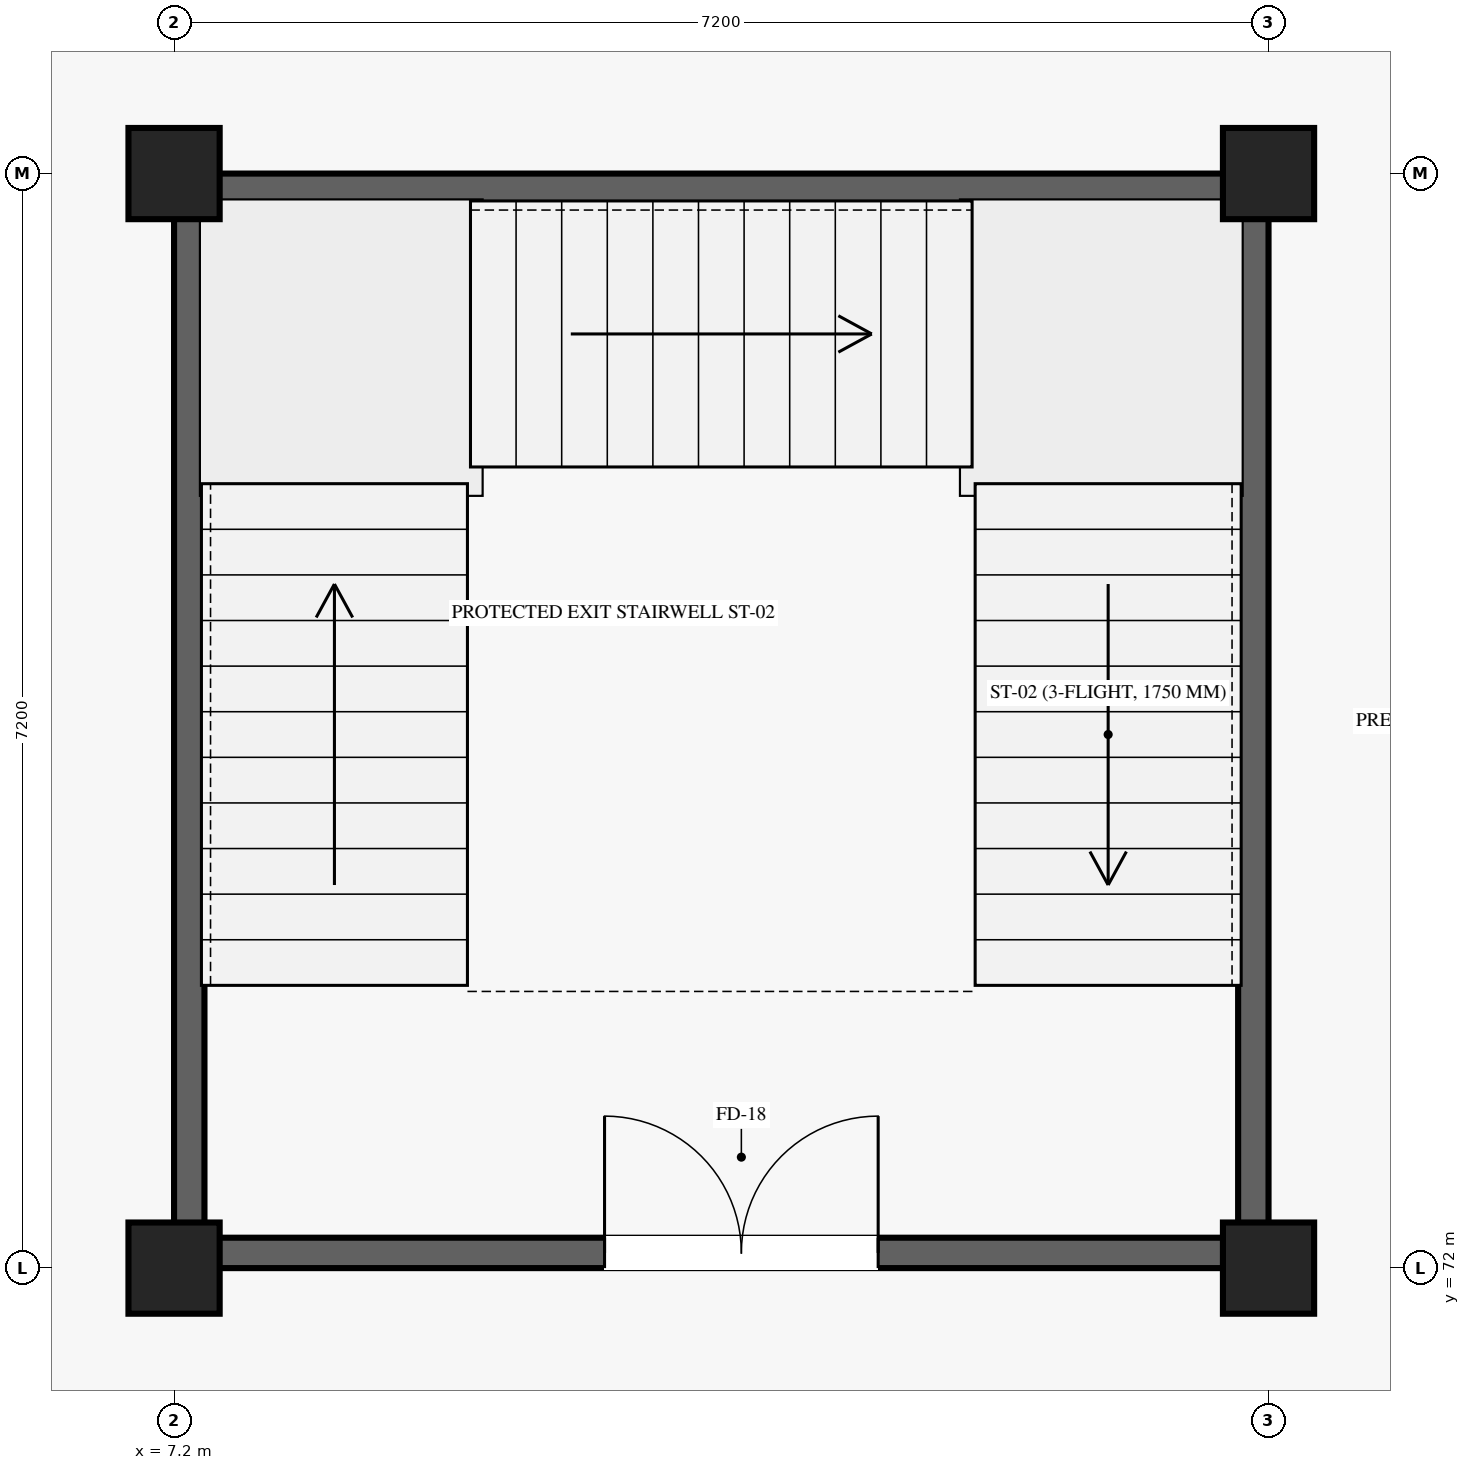
"""IFC4 building model, lengths in metres.
Left out: names, types, materials, properties, quantities, classifications, styles, units other than length and angle.
Written with IfcOpenShell. Run it as: python <this file> out.ifc"""

import sys

from ifc_helpers import new_model, si_unit, direction, frame, frame_2d, origin, origin_2d, place, context, subcontext, project, spatial, rectangle, extrude, element, fill, save


model = new_model("IFC4")
c1 = context("Model", 3, precision=1e-05, world=origin(), true_north=direction((0.0, 1.0)))
c2 = subcontext(c1, "Body", "Model", "MODEL_VIEW")
j1 = project(units=[si_unit("LENGTHUNIT", "METRE"), si_unit("PLANEANGLEUNIT", "RADIAN")], contexts=[c1])
p1 = place(None, origin())
s1 = spatial("IfcSite", under=j1, at=p1, CompositionType="ELEMENT")
p2 = place(p1, origin())
s2 = spatial("IfcBuilding", under=s1, at=p2, CompositionType="ELEMENT")
p3 = place(p2, origin())
s3 = spatial("IfcBuildingStorey", under=s2, at=p3, CompositionType="ELEMENT", Elevation=0.0)
for number, where, z_axis, x_axis in (
    (1, (7.2, 72.0, 0.0), (0.0, 0.0, 1.0), (1.0, 0.0, 0.0)),
    (2, (7.2, 79.2, 0.0), (0.0, 0.0, 1.0), (1.0, 0.0, 0.0)),
    (3, (14.4, 72.0, 0.0), (0.0, 0.0, 1.0), (1.0, 0.0, 0.0)),
    (4, (14.4, 79.2, 0.0), (0.0, 0.0, 1.0), (1.0, 0.0, 0.0)),
):
    element("IfcColumn", number, at=place(p3, frame(where, z_axis=z_axis, x_axis=x_axis)), inside=s3, PredefinedType="COLUMN", context=c2, shape_type="SweptSolid", body=[
        extrude(rectangle(XDim=0.9, YDim=0.9, at=origin_2d()), origin(), (0.0, 0.0, 1.0), 5.4),
    ])
p4 = place(p3, frame((7.4, 72.1, 0.0), z_axis=(0.0, 0.0, 1.0), x_axis=(1.0, 0.0, 0.0)))
e5 = element("IfcWall", 5, at=p4, inside=s3, PredefinedType="SHEAR", context=c2, shape_type="SweptSolid", body=[
    extrude(rectangle(XDim=6.8, YDim=0.2, at=frame_2d((3.4, 0.0))), origin(), (0.0, 0.0, 1.0), 5.16),
])
p5 = place(p4, frame((2.632, 0.0, 0.0)))
e6 = element("IfcOpeningElement", 6, at=p5, cuts=e5, PredefinedType="OPENING", context=c2, shape_type="SweptSolid", body=[
    extrude(rectangle(XDim=1.8, YDim=2.2, at=frame_2d((0.9, 1.1))), frame((0.0, 0.11, 0.0), z_axis=(0.0, -1.0, 0.0), x_axis=(1.0, 0.0, 0.0)), (0.0, 0.0, 1.0), 0.22),
])
for number, where, z_axis, x_axis in (
    (7, (7.4, 79.1, 0.0), (0.0, 0.0, 1.0), (1.0, 0.0, 0.0)),
    (8, (7.3, 72.2, 0.0), (0.0, 0.0, 1.0), (0.0, 1.0, 0.0)),
    (9, (14.3, 72.2, 0.0), (0.0, 0.0, 1.0), (0.0, 1.0, 0.0)),
):
    element("IfcWall", number, at=place(p3, frame(where, z_axis=z_axis, x_axis=x_axis)), inside=s3, PredefinedType="SHEAR", context=c2, shape_type="SweptSolid", body=[
        extrude(rectangle(XDim=6.8, YDim=0.2, at=frame_2d((3.4, 0.0))), origin(), (0.0, 0.0, 1.0), 5.16),
    ])
p6 = place(p5, origin())
e10 = element("IfcDoor", 10, at=p6, inside=s3, OperationType="DOUBLE_DOOR_SINGLE_SWING", PredefinedType="DOOR", context=c2, shape_type="SweptSolid", body=[
    extrude(rectangle(XDim=1.8, YDim=2.2, at=frame_2d((0.9, 1.1))), frame((0.0, 0.025, 0.0), z_axis=(0.0, -1.0, 0.0), x_axis=(1.0, 0.0, 0.0)), (0.0, 0.0, 1.0), 0.05),
])
fill(e6, e10)
save(model, sys.argv[1])
